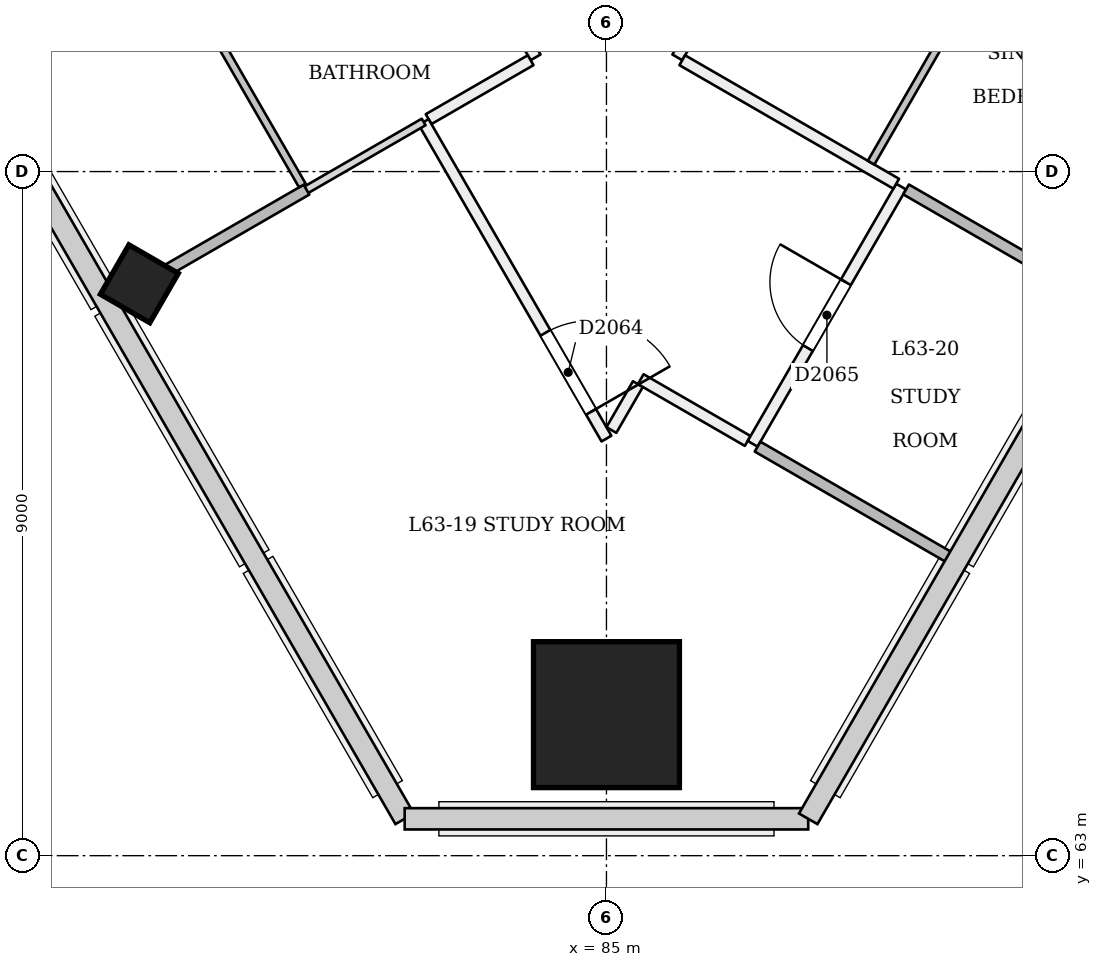
"""IFC4 building model, lengths in metres.
Left out: names, types, materials, properties, quantities, classifications, styles, units other than length and angle.
Written with IfcOpenShell. Run it as: python <this file> out.ifc"""

import sys

from ifc_helpers import new_model, si_unit, direction, frame, frame_2d, origin, origin_2d, place, context, subcontext, project, spatial, rectangle, extrude, element, fill, save


model = new_model("IFC4")
c1 = context("Model", 3, precision=1e-05, world=origin(), true_north=direction((0.0, 1.0)))
c2 = subcontext(c1, "Body", "Model", "MODEL_VIEW")
j1 = project(units=[si_unit("LENGTHUNIT", "METRE"), si_unit("PLANEANGLEUNIT", "RADIAN")], contexts=[c1])
p1 = place(None, origin())
s1 = spatial("IfcSite", under=j1, at=p1, CompositionType="ELEMENT")
p2 = place(p1, origin())
s2 = spatial("IfcBuilding", under=s1, at=p2, CompositionType="ELEMENT")
p3 = place(p2, frame((0.0, 0.0, 246.4)))
s3 = spatial("IfcBuildingStorey", under=s2, at=p3, CompositionType="ELEMENT", Elevation=246.4)
p4 = place(p3, frame((85.0, 64.785, 0.0), z_axis=(0.0, 0.058356907999, 0.998295783467), x_axis=(-1.0, 0.0, 0.0)))
e1 = element("IfcColumn", 1, at=p4, inside=s3, PredefinedType="COLUMN", context=c2, shape_type="SweptSolid", body=[
    extrude(rectangle(XDim=1.92, YDim=1.92, at=origin_2d()), origin(), (0.0, 0.0, 1.0), 3.606),
])
p5 = place(p3, frame((78.828, 70.476, -0.023), z_axis=(0.022153634206, 0.038480930364, 0.999013730882), x_axis=(-0.864977042662, -0.500335915613, 0.038453702226)))
e2 = element("IfcColumn", 2, at=p5, inside=s3, PredefinedType="COLUMN", context=c2, shape_type="SweptSolid", body=[
    extrude(rectangle(XDim=0.75, YDim=0.75, at=origin_2d()), origin(), (0.0, 0.0, 1.0), 3.604),
])
p6 = place(p3, frame((74.196, 90.6, 0.0), z_axis=(0.0, 0.0, 1.0), x_axis=(0.499994700519, -0.86602846342, 0.0)))
e3 = element("IfcWall", 3, at=p6, inside=s3, PredefinedType="PARTITIONING", context=c2, shape_type="SweptSolid", body=[
    extrude(rectangle(XDim=19.743, YDim=0.15, at=frame_2d((9.872, 0.0))), origin(), (0.0, 0.0, 1.0), 2.8),
])
p7 = place(p6, frame((4.638, 0.0, 0.0)))
e4 = element("IfcOpeningElement", 4, at=p7, cuts=e3, PredefinedType="OPENING", context=c2, shape_type="SweptSolid", body=[
    extrude(rectangle(XDim=1.0, YDim=2.1, at=frame_2d((0.5, 1.05))), frame((0.0, 0.085, 0.0), z_axis=(0.0, -1.0, 0.0), x_axis=(1.0, 0.0, 0.0)), (0.0, 0.0, 1.0), 0.171),
])
p8 = place(p6, frame((6.847, 0.0, 0.0)))
e5 = element("IfcOpeningElement", 5, at=p8, cuts=e3, PredefinedType="OPENING", context=c2, shape_type="SweptSolid", body=[
    extrude(rectangle(XDim=1.0, YDim=2.1, at=frame_2d((0.5, 1.05))), frame((0.0, 0.085, 0.0), z_axis=(0.0, -1.0, 0.0), x_axis=(1.0, 0.0, 0.0)), (0.0, 0.0, 1.0), 0.171),
])
p9 = place(p6, frame((13.638, 0.0, 0.0)))
e6 = element("IfcOpeningElement", 6, at=p9, cuts=e3, PredefinedType="OPENING", context=c2, shape_type="SweptSolid", body=[
    extrude(rectangle(XDim=1.0, YDim=2.1, at=frame_2d((0.5, 1.05))), frame((0.0, 0.085, 0.0), z_axis=(0.0, -1.0, 0.0), x_axis=(1.0, 0.0, 0.0)), (0.0, 0.0, 1.0), 0.171),
])
p10 = place(p6, frame((15.814, 0.0, 0.0)))
e7 = element("IfcOpeningElement", 7, at=p10, cuts=e3, PredefinedType="OPENING", context=c2, shape_type="SweptSolid", body=[
    extrude(rectangle(XDim=1.1, YDim=2.1, at=frame_2d((0.55, 1.05))), frame((0.0, 0.085, 0.0), z_axis=(0.0, -1.0, 0.0), x_axis=(1.0, 0.0, 0.0)), (0.0, 0.0, 1.0), 0.171),
])
p11 = place(p3, frame((84.003, 73.465, 0.0), z_axis=(0.0, 0.0, 1.0), x_axis=(-0.86601511528, -0.500017819788, 0.0)))
e8 = element("IfcWall", 8, at=p11, inside=s3, PredefinedType="PARTITIONING", context=c2, shape_type="SweptSolid", body=[
    extrude(rectangle(XDim=1.55, YDim=0.15, at=frame_2d((0.775, 0.0))), origin(), (0.0, 0.0, 1.0), 3.2),
])
p12 = place(p3, frame((82.595, 72.652, 0.0), z_axis=(0.0, 0.0, 1.0), x_axis=(0.500015396624, -0.866016514357, 0.0)))
e9 = element("IfcWall", 9, at=p12, inside=s3, PredefinedType="PARTITIONING", context=c2, shape_type="SweptSolid", body=[
    extrude(rectangle(XDim=4.809, YDim=0.15, at=frame_2d((2.405, 0.0))), origin(), (0.0, 0.0, 1.0), 3.2),
])
p13 = place(p12, frame((3.203, 0.0, 0.0)))
e10 = element("IfcOpeningElement", 10, at=p13, cuts=e9, PredefinedType="OPENING", context=c2, shape_type="SweptSolid", body=[
    extrude(rectangle(XDim=1.2, YDim=2.1, at=frame_2d((0.6, 1.05))), frame((0.0, 0.085, 0.0), z_axis=(0.0, -1.0, 0.0), x_axis=(1.0, 0.0, 0.0)), (0.0, 0.0, 1.0), 0.171),
])
p14 = place(p3, frame((85.065, 68.6, 0.0), z_axis=(0.0, 0.0, 1.0), x_axis=(0.500055883433, 0.865993137065, 0.0)))
e11 = element("IfcWall", 11, at=p14, inside=s3, PredefinedType="PARTITIONING", context=c2, shape_type="SweptSolid", body=[
    extrude(rectangle(XDim=0.697, YDim=0.15, at=frame_2d((0.349, 0.0))), origin(), (0.0, 0.0, 1.0), 3.2),
])
p15 = place(p3, frame((85.451, 69.269, 0.0), z_axis=(0.0, 0.0, 1.0), x_axis=(0.866015446554, -0.500017246033, 0.0)))
e12 = element("IfcWall", 12, at=p15, inside=s3, PredefinedType="PARTITIONING", context=c2, shape_type="SweptSolid", body=[
    extrude(rectangle(XDim=1.625, YDim=0.15, at=frame_2d((0.812, 0.0))), origin(), (0.0, 0.0, 1.0), 3.2),
])
p16 = place(p3, frame((86.923, 68.419, 0.0), z_axis=(0.0, 0.0, 1.0), x_axis=(0.500023555316, 0.866011803689, 0.0)))
e13 = element("IfcWall", 13, at=p16, inside=s3, PredefinedType="PARTITIONING", context=c2, shape_type="SweptSolid", body=[
    extrude(rectangle(XDim=3.907, YDim=0.15, at=frame_2d((1.954, 0.0))), origin(), (0.0, 0.0, 1.0), 3.2),
])
p17 = place(p16, frame((1.454, 0.0, 0.0)))
e14 = element("IfcOpeningElement", 14, at=p17, cuts=e13, PredefinedType="OPENING", context=c2, shape_type="SweptSolid", body=[
    extrude(rectangle(XDim=1.0, YDim=2.1, at=frame_2d((0.5, 1.05))), frame((0.0, 0.085, 0.0), z_axis=(0.0, -1.0, 0.0), x_axis=(1.0, 0.0, 0.0)), (0.0, 0.0, 1.0), 0.171),
])
p18 = place(p3, frame((85.932, 73.502, 0.0), z_axis=(0.0, 0.0, 1.0), x_axis=(0.499994700519, 0.86602846342, 0.0)))
e15 = element("IfcWall", 15, at=p18, inside=s3, PredefinedType="PARTITIONING", context=c2, shape_type="SweptSolid", body=[
    extrude(rectangle(XDim=19.743, YDim=0.15, at=frame_2d((9.872, 0.0))), origin(), (0.0, 0.0, 1.0), 2.8),
])
p19 = place(p18, frame((2.78, 0.0, 0.0)))
e16 = element("IfcOpeningElement", 16, at=p19, cuts=e15, PredefinedType="OPENING", context=c2, shape_type="SweptSolid", body=[
    extrude(rectangle(XDim=1.0, YDim=2.1, at=frame_2d((0.5, 1.05))), frame((0.0, 0.085, 0.0), z_axis=(0.0, -1.0, 0.0), x_axis=(1.0, 0.0, 0.0)), (0.0, 0.0, 1.0), 0.171),
])
p20 = place(p18, frame((5.105, 0.0, 0.0)))
e17 = element("IfcOpeningElement", 17, at=p20, cuts=e15, PredefinedType="OPENING", context=c2, shape_type="SweptSolid", body=[
    extrude(rectangle(XDim=1.0, YDim=2.1, at=frame_2d((0.5, 1.05))), frame((0.0, 0.085, 0.0), z_axis=(0.0, -1.0, 0.0), x_axis=(1.0, 0.0, 0.0)), (0.0, 0.0, 1.0), 0.171),
])
p21 = place(p18, frame((12.9, 0.0, 0.0)))
e18 = element("IfcOpeningElement", 18, at=p21, cuts=e15, PredefinedType="OPENING", context=c2, shape_type="SweptSolid", body=[
    extrude(rectangle(XDim=1.2, YDim=2.1, at=frame_2d((0.6, 1.05))), frame((0.0, 0.085, 0.0), z_axis=(0.0, -1.0, 0.0), x_axis=(1.0, 0.0, 0.0)), (0.0, 0.0, 1.0), 0.171),
])
p22 = place(p3, frame((88.812, 71.84, 0.0), z_axis=(0.0, 0.0, 1.0), x_axis=(-0.866034226713, 0.499984717929, 0.0)))
e19 = element("IfcWall", 19, at=p22, inside=s3, PredefinedType="PARTITIONING", context=c2, shape_type="SweptSolid", body=[
    extrude(rectangle(XDim=3.25, YDim=0.15, at=frame_2d((1.625, 0.0))), origin(), (0.0, 0.0, 1.0), 3.2),
])
p23 = place(p3, frame((80.999, 71.817, 0.0), z_axis=(0.0, 0.0, 1.0), x_axis=(-0.499976333282, 0.866039067339, 0.0)))
e20 = element("IfcWall", 20, at=p23, inside=s3, PredefinedType="PARTITIONING", context=c2, shape_type="SweptSolid", body=[
    extrude(rectangle(XDim=2.525, YDim=0.1, at=frame_2d((1.262, 0.0))), origin(), (0.0, 0.0, 1.0), 3.2),
])
p24 = place(p3, frame((78.525, 70.302, 0.0), z_axis=(0.0, 0.0, 1.0), x_axis=(0.866032430508, 0.49998782916, 0.0)))
e21 = element("IfcWall", 21, at=p24, inside=s3, PredefinedType="PARTITIONING", context=c2, shape_type="SweptSolid", body=[
    extrude(rectangle(XDim=2.92, YDim=0.15, at=frame_2d((1.46, 0.0))), origin(), (0.0, 0.0, 1.0), 2.7),
])
p25 = place(p3, frame((81.019, 71.742, 0.0), z_axis=(0.0, 0.0, 1.0), x_axis=(0.865989003036, 0.500063042646, 0.0)))
e22 = element("IfcWall", 22, at=p25, inside=s3, PredefinedType="PARTITIONING", context=c2, shape_type="SweptSolid", body=[
    extrude(rectangle(XDim=1.82, YDim=0.1, at=frame_2d((0.91, 0.0))), origin(), (0.0, 0.0, 1.0), 3.2),
])
p26 = place(p3, frame((89.539, 66.908, 0.0), z_axis=(0.0, 0.0, 1.0), x_axis=(-0.866030989016, 0.499990325971, 0.0)))
e23 = element("IfcWall", 23, at=p26, inside=s3, PredefinedType="PARTITIONING", context=c2, shape_type="SweptSolid", body=[
    extrude(rectangle(XDim=2.945, YDim=0.15, at=frame_2d((1.473, 0.0))), origin(), (0.0, 0.0, 1.0), 2.7),
])
p27 = place(p3, frame((91.475, 70.302, 0.0), z_axis=(0.0, 0.0, 1.0), x_axis=(-0.86601045545, 0.500025890382, 0.0)))
e24 = element("IfcWall", 24, at=p27, inside=s3, PredefinedType="PARTITIONING", context=c2, shape_type="SweptSolid", body=[
    extrude(rectangle(XDim=2.925, YDim=0.15, at=frame_2d((1.462, 0.0))), origin(), (0.0, 0.0, 1.0), 2.7),
])
p28 = place(p3, frame((89.694, 74.217, 0.0), z_axis=(0.0, 0.0, 1.0), x_axis=(-0.499972286653, -0.866041403502, 0.0)))
e25 = element("IfcWall", 25, at=p28, inside=s3, PredefinedType="PARTITIONING", context=c2, shape_type="SweptSolid", body=[
    extrude(rectangle(XDim=2.425, YDim=0.1, at=frame_2d((1.212, 0.0))), origin(), (0.0, 0.0, 1.0), 3.2),
])
p29 = place(p13, origin())
e26 = element("IfcDoor", 26, at=p29, inside=s3, OperationType="SINGLE_SWING_RIGHT", PredefinedType="NOTDEFINED", context=c2, shape_type="SweptSolid", body=[
    extrude(rectangle(XDim=1.2, YDim=2.1, at=frame_2d((0.6, 1.05))), frame((0.0, 0.025, 0.0), z_axis=(0.0, -1.0, 0.0), x_axis=(1.0, 0.0, 0.0)), (0.0, 0.0, 1.0), 0.05),
])
fill(e10, e26)
p30 = place(p17, origin())
e27 = element("IfcDoor", 27, at=p30, inside=s3, OperationType="SINGLE_SWING_RIGHT", PredefinedType="NOTDEFINED", context=c2, shape_type="SweptSolid", body=[
    extrude(rectangle(XDim=1.0, YDim=2.1, at=frame_2d((0.5, 1.05))), frame((0.0, 0.025, 0.0), z_axis=(0.0, -1.0, 0.0), x_axis=(1.0, 0.0, 0.0)), (0.0, 0.0, 1.0), 0.05),
])
fill(e14, e27)
save(model, sys.argv[1])
